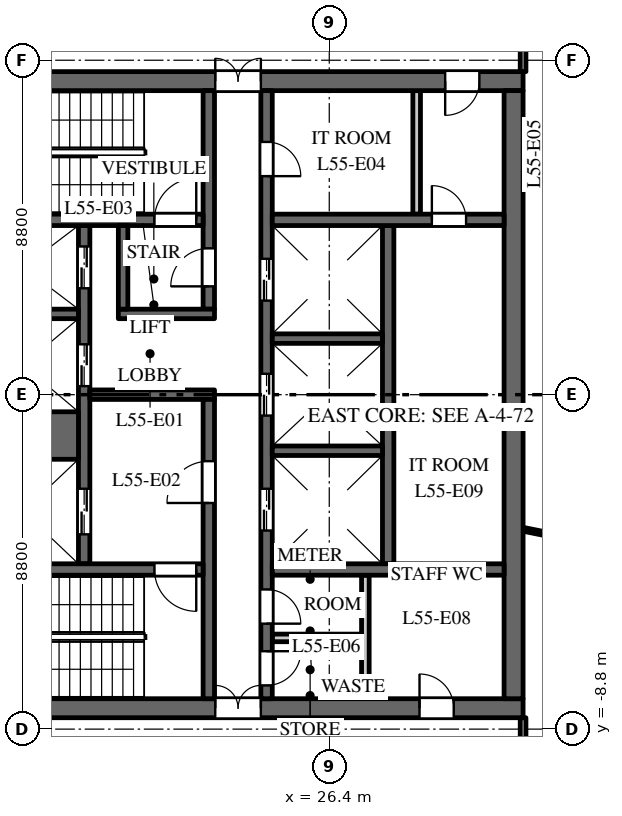
"""IFC4 building model, lengths in metres.
Left out: names, types, materials, properties, quantities, classifications, styles, units other than length and angle.
Written with IfcOpenShell. Run it as: python <this file> out.ifc"""

import sys

from ifc_helpers import new_model, si_unit, direction, frame, frame_2d, origin, place, context, subcontext, project, spatial, rectangle, extrude, element, fill, save


model = new_model("IFC4")
c1 = context("Model", 3, precision=1e-05, world=origin(), true_north=direction((0.0, 1.0)))
c2 = subcontext(c1, "Body", "Model", "MODEL_VIEW")
j1 = project(units=[si_unit("LENGTHUNIT", "METRE"), si_unit("PLANEANGLEUNIT", "RADIAN")], contexts=[c1])
p1 = place(None, origin())
s1 = spatial("IfcSite", under=j1, at=p1, CompositionType="ELEMENT")
p2 = place(p1, origin())
s2 = spatial("IfcBuilding", under=s1, at=p2, CompositionType="ELEMENT")
p3 = place(p2, frame((0.0, 0.0, 261.5)))
s3 = spatial("IfcBuildingStorey", under=s2, at=p3, CompositionType="ELEMENT", Elevation=261.5)
p4 = place(p3, frame((16.5, 8.25, 0.0), z_axis=(0.0, 0.0, 1.0), x_axis=(1.0, 0.0, 0.0)))
e1 = element("IfcWall", 1, at=p4, inside=s3, PredefinedType="SHEAR", context=c2, shape_type="SweptSolid", body=[
    extrude(rectangle(XDim=15.0, YDim=0.5, at=frame_2d((7.5, 0.0))), origin(), (0.0, 0.0, 1.0), 3.7),
])
p5 = place(p4, frame((6.9, 0.0, 0.0)))
e2 = element("IfcOpeningElement", 2, at=p5, cuts=e1, PredefinedType="OPENING", context=c2, shape_type="SweptSolid", body=[
    extrude(rectangle(XDim=1.2, YDim=2.1, at=frame_2d((0.6, 1.05))), frame((0.0, 0.26, 0.0), z_axis=(0.0, -1.0, 0.0), x_axis=(1.0, 0.0, 0.0)), (0.0, 0.0, 1.0), 0.52),
])
p6 = place(p4, frame((12.95, 0.0, 0.0)))
e3 = element("IfcOpeningElement", 3, at=p6, cuts=e1, PredefinedType="OPENING", context=c2, shape_type="SweptSolid", body=[
    extrude(rectangle(XDim=0.9, YDim=2.1, at=frame_2d((0.45, 1.05))), frame((0.0, 0.26, 0.0), z_axis=(0.0, -1.0, 0.0), x_axis=(1.0, 0.0, 0.0)), (0.0, 0.0, 1.0), 0.52),
])
p7 = place(p3, frame((16.5, -8.25, 0.0), z_axis=(0.0, 0.0, 1.0), x_axis=(1.0, 0.0, 0.0)))
e4 = element("IfcWall", 4, at=p7, inside=s3, PredefinedType="SHEAR", context=c2, shape_type="SweptSolid", body=[
    extrude(rectangle(XDim=15.0, YDim=0.5, at=frame_2d((7.5, 0.0))), origin(), (0.0, 0.0, 1.0), 3.7),
])
p8 = place(p7, frame((6.9, 0.0, 0.0)))
e5 = element("IfcOpeningElement", 5, at=p8, cuts=e4, PredefinedType="OPENING", context=c2, shape_type="SweptSolid", body=[
    extrude(rectangle(XDim=1.2, YDim=2.1, at=frame_2d((0.6, 1.05))), frame((0.0, 0.26, 0.0), z_axis=(0.0, -1.0, 0.0), x_axis=(1.0, 0.0, 0.0)), (0.0, 0.0, 1.0), 0.52),
])
p9 = place(p7, frame((12.275, 0.0, 0.0)))
e6 = element("IfcOpeningElement", 6, at=p9, cuts=e4, PredefinedType="OPENING", context=c2, shape_type="SweptSolid", body=[
    extrude(rectangle(XDim=0.9, YDim=2.1, at=frame_2d((0.45, 1.05))), frame((0.0, 0.26, 0.0), z_axis=(0.0, -1.0, 0.0), x_axis=(1.0, 0.0, 0.0)), (0.0, 0.0, 1.0), 0.52),
])
p10 = place(p3, frame((27.95, -4.45, 0.0), z_axis=(0.0, 0.0, 1.0), x_axis=(0.0, 1.0, 0.0)))
e7 = element("IfcWall", 7, at=p10, inside=s3, PredefinedType="SHEAR", context=c2, shape_type="SweptSolid", body=[
    extrude(rectangle(XDim=8.9, YDim=0.3, at=frame_2d((4.45, 0.0))), origin(), (0.0, 0.0, 1.0), 3.7),
])
p11 = place(p3, frame((19.95, -4.45, 0.0), z_axis=(0.0, 0.0, 1.0), x_axis=(0.0, 1.0, 0.0)))
e8 = element("IfcWall", 8, at=p11, inside=s3, PredefinedType="SHEAR", context=c2, shape_type="SweptSolid", body=[
    extrude(rectangle(XDim=8.9, YDim=0.3, at=frame_2d((4.45, 0.0))), origin(), (0.0, 0.0, 1.0), 3.7),
])
p12 = place(p11, frame((0.775, 0.0, 0.0)))
e9 = element("IfcOpeningElement", 9, at=p12, cuts=e8, PredefinedType="OPENING", context=c2, shape_type="SweptSolid", body=[
    extrude(rectangle(XDim=1.2, YDim=2.1, at=frame_2d((0.6, 1.05))), frame((0.0, 0.16, 0.0), z_axis=(0.0, -1.0, 0.0), x_axis=(1.0, 0.0, 0.0)), (0.0, 0.0, 1.0), 0.32),
])
p13 = place(p11, frame((4.675, 0.0, 0.0)))
e10 = element("IfcOpeningElement", 10, at=p13, cuts=e8, PredefinedType="OPENING", context=c2, shape_type="SweptSolid", body=[
    extrude(rectangle(XDim=1.1, YDim=2.1, at=frame_2d((0.55, 1.05))), frame((0.0, 0.16, 0.0), z_axis=(0.0, -1.0, 0.0), x_axis=(1.0, 0.0, 0.0)), (0.0, 0.0, 1.0), 0.32),
])
p14 = place(p11, frame((7.25, 0.0, 0.0)))
e11 = element("IfcOpeningElement", 11, at=p14, cuts=e8, PredefinedType="OPENING", context=c2, shape_type="SweptSolid", body=[
    extrude(rectangle(XDim=1.1, YDim=2.1, at=frame_2d((0.55, 1.05))), frame((0.0, 0.16, 0.0), z_axis=(0.0, -1.0, 0.0), x_axis=(1.0, 0.0, 0.0)), (0.0, 0.0, 1.0), 0.32),
])
p15 = place(p3, frame((24.75, -8.0, 0.0), z_axis=(0.0, 0.0, 1.0), x_axis=(0.0, 1.0, 0.0)))
e12 = element("IfcWall", 12, at=p15, inside=s3, PredefinedType="SHEAR", context=c2, shape_type="SweptSolid", body=[
    extrude(rectangle(XDim=16.0, YDim=0.3, at=frame_2d((8.0, 0.0))), origin(), (0.0, 0.0, 1.0), 3.7),
])
p16 = place(p15, frame((4.425, 0.0, 0.0)))
e13 = element("IfcOpeningElement", 13, at=p16, cuts=e12, PredefinedType="OPENING", context=c2, shape_type="SweptSolid", body=[
    extrude(rectangle(XDim=1.1, YDim=2.1, at=frame_2d((0.55, 1.05))), frame((0.0, 0.16, 0.0), z_axis=(0.0, -1.0, 0.0), x_axis=(1.0, 0.0, 0.0)), (0.0, 0.0, 1.0), 0.32),
])
p17 = place(p15, frame((7.45, 0.0, 0.0)))
e14 = element("IfcOpeningElement", 14, at=p17, cuts=e12, PredefinedType="OPENING", context=c2, shape_type="SweptSolid", body=[
    extrude(rectangle(XDim=1.1, YDim=2.1, at=frame_2d((0.55, 1.05))), frame((0.0, 0.16, 0.0), z_axis=(0.0, -1.0, 0.0), x_axis=(1.0, 0.0, 0.0)), (0.0, 0.0, 1.0), 0.32),
])
p18 = place(p15, frame((10.475, 0.0, 0.0)))
e15 = element("IfcOpeningElement", 15, at=p18, cuts=e12, PredefinedType="OPENING", context=c2, shape_type="SweptSolid", body=[
    extrude(rectangle(XDim=1.1, YDim=2.1, at=frame_2d((0.55, 1.05))), frame((0.0, 0.16, 0.0), z_axis=(0.0, -1.0, 0.0), x_axis=(1.0, 0.0, 0.0)), (0.0, 0.0, 1.0), 0.32),
])
p19 = place(p15, frame((13.75, 0.0, 0.0)))
e16 = element("IfcOpeningElement", 16, at=p19, cuts=e12, PredefinedType="OPENING", context=c2, shape_type="SweptSolid", body=[
    extrude(rectangle(XDim=0.9, YDim=2.1, at=frame_2d((0.45, 1.05))), frame((0.0, 0.16, 0.0), z_axis=(0.0, -1.0, 0.0), x_axis=(1.0, 0.0, 0.0)), (0.0, 0.0, 1.0), 0.32),
])
p20 = place(p15, frame((1.975, 0.0, 0.0)))
e17 = element("IfcOpeningElement", 17, at=p20, cuts=e12, PredefinedType="OPENING", context=c2, shape_type="SweptSolid", body=[
    extrude(rectangle(XDim=0.9, YDim=2.1, at=frame_2d((0.45, 1.05))), frame((0.0, 0.16, 0.0), z_axis=(0.0, -1.0, 0.0), x_axis=(1.0, 0.0, 0.0)), (0.0, 0.0, 1.0), 0.32),
])
p21 = place(p15, frame((0.35, 0.0, 0.0)))
e18 = element("IfcOpeningElement", 18, at=p21, cuts=e12, PredefinedType="OPENING", context=c2, shape_type="SweptSolid", body=[
    extrude(rectangle(XDim=0.9, YDim=2.1, at=frame_2d((0.45, 1.05))), frame((0.0, 0.16, 0.0), z_axis=(0.0, -1.0, 0.0), x_axis=(1.0, 0.0, 0.0)), (0.0, 0.0, 1.0), 0.32),
])
p22 = place(p3, frame((20.1, 0.0, 0.0), z_axis=(0.0, 0.0, 1.0), x_axis=(1.0, 0.0, 0.0)))
e19 = element("IfcWall", 19, at=p22, inside=s3, PredefinedType="SHEAR", context=c2, shape_type="SweptSolid", body=[
    extrude(rectangle(XDim=3.28, YDim=0.25, at=frame_2d((1.64, 0.0))), origin(), (0.0, 0.0, 1.0), 3.7),
])
p23 = place(p3, frame((31.25, -8.0, 0.0), z_axis=(0.0, 0.0, 1.0), x_axis=(0.0, 1.0, 0.0)))
e20 = element("IfcWall", 20, at=p23, inside=s3, PredefinedType="SHEAR", context=c2, shape_type="SweptSolid", body=[
    extrude(rectangle(XDim=16.0, YDim=0.5, at=frame_2d((8.0, 0.0))), origin(), (0.0, 0.0, 1.0), 3.7),
])
p24 = place(p3, frame((24.9, 4.6, 0.0), z_axis=(0.0, 0.0, 1.0), x_axis=(1.0, 0.0, 0.0)))
e21 = element("IfcWall", 21, at=p24, inside=s3, PredefinedType="SHEAR", context=c2, shape_type="SweptSolid", body=[
    extrude(rectangle(XDim=6.1, YDim=0.3, at=frame_2d((3.05, 0.0))), origin(), (0.0, 0.0, 1.0), 3.7),
])
p25 = place(p24, frame((4.2, 0.0, 0.0)))
e22 = element("IfcOpeningElement", 22, at=p25, cuts=e21, PredefinedType="OPENING", context=c2, shape_type="SweptSolid", body=[
    extrude(rectangle(XDim=0.9, YDim=2.1, at=frame_2d((0.45, 1.05))), frame((0.0, 0.16, 0.0), z_axis=(0.0, -1.0, 0.0), x_axis=(1.0, 0.0, 0.0)), (0.0, 0.0, 1.0), 0.32),
])
for number, where, z_axis, x_axis in (
    (23, (28.7, 4.75, 0.0), (0.0, 0.0, 1.0), (0.0, 1.0, 0.0)),
    (24, (27.35, -8.0, 0.0), (0.0, 0.0, 1.0), (0.0, 1.0, 0.0)),
):
    element("IfcWall", number, at=place(p3, frame(where, z_axis=z_axis, x_axis=x_axis)), inside=s3, PredefinedType="PARTITIONING", context=c2, shape_type="SweptSolid", body=[
        extrude(rectangle(XDim=3.25, YDim=0.2, at=frame_2d((1.625, 0.0))), origin(), (0.0, 0.0, 1.0), 3.7),
    ])
p26 = place(p3, frame((24.9, -6.4, 0.0), z_axis=(0.0, 0.0, 1.0), x_axis=(1.0, 0.0, 0.0)))
e25 = element("IfcWall", 25, at=p26, inside=s3, PredefinedType="PARTITIONING", context=c2, shape_type="SweptSolid", body=[
    extrude(rectangle(XDim=2.35, YDim=0.2, at=frame_2d((1.175, 0.0))), origin(), (0.0, 0.0, 1.0), 3.7),
])
p27 = place(p3, frame((24.9, -4.6, 0.0), z_axis=(0.0, 0.0, 1.0), x_axis=(1.0, 0.0, 0.0)))
e26 = element("IfcWall", 26, at=p27, inside=s3, PredefinedType="SHEAR", context=c2, shape_type="SweptSolid", body=[
    extrude(rectangle(XDim=6.1, YDim=0.3, at=frame_2d((3.05, 0.0))), origin(), (0.0, 0.0, 1.0), 3.7),
])
p28 = place(p3, frame((16.9, -1.075, 0.0), z_axis=(0.0, 0.0, 1.0), x_axis=(1.0, 0.0, 0.0)))
e27 = element("IfcWall", 27, at=p28, inside=s3, PredefinedType="SHEAR", context=c2, shape_type="SweptSolid", body=[
    extrude(rectangle(XDim=2.9, YDim=1.25, at=frame_2d((1.45, 0.0))), origin(), (0.0, 0.0, 1.0), 3.7),
])
for number, where, z_axis, x_axis in (
    (28, (16.9, 2.125, 0.0), (0.0, 0.0, 1.0), (1.0, 0.0, 0.0)),
    (29, (24.9, -1.475, 0.0), (0.0, 0.0, 1.0), (1.0, 0.0, 0.0)),
    (30, (24.9, 1.475, 0.0), (0.0, 0.0, 1.0), (1.0, 0.0, 0.0)),
):
    element("IfcWall", number, at=place(p3, frame(where, z_axis=z_axis, x_axis=x_axis)), inside=s3, PredefinedType="SHEAR", context=c2, shape_type="SweptSolid", body=[
        extrude(rectangle(XDim=2.9, YDim=0.25, at=frame_2d((1.45, 0.0))), origin(), (0.0, 0.0, 1.0), 3.7),
    ])
p29 = place(p3, frame((23.23, 2.25, 0.0), z_axis=(0.0, 0.0, 1.0), x_axis=(0.0, 1.0, 0.0)))
e31 = element("IfcWall", 31, at=p29, inside=s3, PredefinedType="SHEAR", context=c2, shape_type="SweptSolid", body=[
    extrude(rectangle(XDim=5.75, YDim=0.3, at=frame_2d((2.875, 0.0))), origin(), (0.0, 0.0, 1.0), 3.7),
])
p30 = place(p29, frame((0.6, 0.0, 0.0)))
e32 = element("IfcOpeningElement", 32, at=p30, cuts=e31, PredefinedType="OPENING", context=c2, shape_type="SweptSolid", body=[
    extrude(rectangle(XDim=1.0, YDim=2.1, at=frame_2d((0.5, 1.05))), frame((0.0, 0.16, 0.0), z_axis=(0.0, -1.0, 0.0), x_axis=(1.0, 0.0, 0.0)), (0.0, 0.0, 1.0), 0.32),
])
p31 = place(p3, frame((23.23, -8.0, 0.0), z_axis=(0.0, 0.0, 1.0), x_axis=(0.0, 1.0, 0.0)))
e33 = element("IfcWall", 33, at=p31, inside=s3, PredefinedType="SHEAR", context=c2, shape_type="SweptSolid", body=[
    extrude(rectangle(XDim=7.875, YDim=0.3, at=frame_2d((3.938, 0.0))), origin(), (0.0, 0.0, 1.0), 3.7),
])
p32 = place(p31, frame((5.15, 0.0, 0.0)))
e34 = element("IfcOpeningElement", 34, at=p32, cuts=e33, PredefinedType="OPENING", context=c2, shape_type="SweptSolid", body=[
    extrude(rectangle(XDim=1.1, YDim=2.1, at=frame_2d((0.55, 1.05))), frame((0.0, 0.16, 0.0), z_axis=(0.0, -1.0, 0.0), x_axis=(1.0, 0.0, 0.0)), (0.0, 0.0, 1.0), 0.32),
])
p33 = place(p3, frame((16.9, 4.6, 0.0), z_axis=(0.0, 0.0, 1.0), x_axis=(1.0, 0.0, 0.0)))
e35 = element("IfcWall", 35, at=p33, inside=s3, PredefinedType="SHEAR", context=c2, shape_type="SweptSolid", body=[
    extrude(rectangle(XDim=6.18, YDim=0.3, at=frame_2d((3.09, 0.0))), origin(), (0.0, 0.0, 1.0), 3.7),
])
p34 = place(p33, frame((4.9, 0.0, 0.0)))
e36 = element("IfcOpeningElement", 36, at=p34, cuts=e35, PredefinedType="OPENING", context=c2, shape_type="SweptSolid", body=[
    extrude(rectangle(XDim=1.1, YDim=2.1, at=frame_2d((0.55, 1.05))), frame((0.0, 0.16, 0.0), z_axis=(0.0, -1.0, 0.0), x_axis=(1.0, 0.0, 0.0)), (0.0, 0.0, 1.0), 0.32),
])
p35 = place(p3, frame((16.9, -4.6, 0.0), z_axis=(0.0, 0.0, 1.0), x_axis=(1.0, 0.0, 0.0)))
e37 = element("IfcWall", 37, at=p35, inside=s3, PredefinedType="SHEAR", context=c2, shape_type="SweptSolid", body=[
    extrude(rectangle(XDim=6.18, YDim=0.3, at=frame_2d((3.09, 0.0))), origin(), (0.0, 0.0, 1.0), 3.7),
])
p36 = place(p35, frame((4.9, 0.0, 0.0)))
e38 = element("IfcOpeningElement", 38, at=p36, cuts=e37, PredefinedType="OPENING", context=c2, shape_type="SweptSolid", body=[
    extrude(rectangle(XDim=1.1, YDim=2.1, at=frame_2d((0.55, 1.05))), frame((0.0, 0.16, 0.0), z_axis=(0.0, -1.0, 0.0), x_axis=(1.0, 0.0, 0.0)), (0.0, 0.0, 1.0), 0.32),
])
p37 = place(p3, frame((20.85, 2.125, 0.0), z_axis=(0.0, 0.0, 1.0), x_axis=(1.0, 0.0, 0.0)))
e39 = element("IfcWall", 39, at=p37, inside=s3, PredefinedType="SHEAR", context=c2, shape_type="SweptSolid", body=[
    extrude(rectangle(XDim=2.53, YDim=0.25, at=frame_2d((1.265, 0.0))), origin(), (0.0, 0.0, 1.0), 3.7),
])
p38 = place(p3, frame((20.975, 2.25, 0.0), z_axis=(0.0, 0.0, 1.0), x_axis=(0.0, 1.0, 0.0)))
e40 = element("IfcWall", 40, at=p38, inside=s3, PredefinedType="SHEAR", context=c2, shape_type="SweptSolid", body=[
    extrude(rectangle(XDim=2.2, YDim=0.25, at=frame_2d((1.1, 0.0))), origin(), (0.0, 0.0, 1.0), 3.7),
])
p39 = place(p3, frame((31.5, -10.7, 0.0), z_axis=(0.0, 0.0, 1.0), x_axis=(0.0, 1.0, 0.0)))
e41 = element("IfcWall", 41, at=p39, inside=s3, PredefinedType="PARTITIONING", context=c2, shape_type="SweptSolid", body=[
    extrude(rectangle(XDim=2.2, YDim=0.15, at=frame_2d((1.1, 0.0))), origin(), (0.0, 0.0, 1.0), 3.0),
])
p40 = place(p3, frame((31.5, -3.542, 0.0), z_axis=(0.0, 0.0, 1.0), x_axis=(0.980357474535, -0.197228857227, 0.0)))
e42 = element("IfcWall", 42, at=p40, inside=s3, PredefinedType="PARTITIONING", context=c2, shape_type="SweptSolid", body=[
    extrude(rectangle(XDim=4.092, YDim=0.1, at=frame_2d((2.046, 0.0))), origin(), (0.0, 0.0, 1.0), 3.0),
])
p41 = place(p3, frame((31.5, 8.5, 0.0), z_axis=(0.0, 0.0, 1.0), x_axis=(0.0, 1.0, 0.0)))
e43 = element("IfcWall", 43, at=p41, inside=s3, PredefinedType="PARTITIONING", context=c2, shape_type="SweptSolid", body=[
    extrude(rectangle(XDim=2.2, YDim=0.15, at=frame_2d((1.1, 0.0))), origin(), (0.0, 0.0, 1.0), 3.0),
])
p42 = place(p12, origin())
e44 = element("IfcDoor", 44, at=p42, inside=s3, OperationType="DOUBLE_DOOR_SLIDING", PredefinedType="DOOR", context=c2, shape_type="SweptSolid", body=[
    extrude(rectangle(XDim=1.2, YDim=2.1, at=frame_2d((0.6, 1.05))), frame((0.0, 0.025, 0.0), z_axis=(0.0, -1.0, 0.0), x_axis=(1.0, 0.0, 0.0)), (0.0, 0.0, 1.0), 0.05),
])
fill(e9, e44)
p43 = place(p13, origin())
e45 = element("IfcDoor", 45, at=p43, inside=s3, OperationType="DOUBLE_DOOR_SLIDING", PredefinedType="DOOR", context=c2, shape_type="SweptSolid", body=[
    extrude(rectangle(XDim=1.1, YDim=2.1, at=frame_2d((0.55, 1.05))), frame((0.0, 0.025, 0.0), z_axis=(0.0, -1.0, 0.0), x_axis=(1.0, 0.0, 0.0)), (0.0, 0.0, 1.0), 0.05),
])
fill(e10, e45)
p44 = place(p14, origin())
e46 = element("IfcDoor", 46, at=p44, inside=s3, OperationType="DOUBLE_DOOR_SLIDING", PredefinedType="DOOR", context=c2, shape_type="SweptSolid", body=[
    extrude(rectangle(XDim=1.1, YDim=2.1, at=frame_2d((0.55, 1.05))), frame((0.0, 0.025, 0.0), z_axis=(0.0, -1.0, 0.0), x_axis=(1.0, 0.0, 0.0)), (0.0, 0.0, 1.0), 0.05),
])
fill(e11, e46)
p45 = place(p16, origin())
e47 = element("IfcDoor", 47, at=p45, inside=s3, OperationType="DOUBLE_DOOR_SLIDING", PredefinedType="DOOR", context=c2, shape_type="SweptSolid", body=[
    extrude(rectangle(XDim=1.1, YDim=2.1, at=frame_2d((0.55, 1.05))), frame((0.0, 0.025, 0.0), z_axis=(0.0, -1.0, 0.0), x_axis=(1.0, 0.0, 0.0)), (0.0, 0.0, 1.0), 0.05),
])
fill(e13, e47)
p46 = place(p17, origin())
e48 = element("IfcDoor", 48, at=p46, inside=s3, OperationType="DOUBLE_DOOR_SLIDING", PredefinedType="DOOR", context=c2, shape_type="SweptSolid", body=[
    extrude(rectangle(XDim=1.1, YDim=2.1, at=frame_2d((0.55, 1.05))), frame((0.0, 0.025, 0.0), z_axis=(0.0, -1.0, 0.0), x_axis=(1.0, 0.0, 0.0)), (0.0, 0.0, 1.0), 0.05),
])
fill(e14, e48)
p47 = place(p18, origin())
e49 = element("IfcDoor", 49, at=p47, inside=s3, OperationType="DOUBLE_DOOR_SLIDING", PredefinedType="DOOR", context=c2, shape_type="SweptSolid", body=[
    extrude(rectangle(XDim=1.1, YDim=2.1, at=frame_2d((0.55, 1.05))), frame((0.0, 0.025, 0.0), z_axis=(0.0, -1.0, 0.0), x_axis=(1.0, 0.0, 0.0)), (0.0, 0.0, 1.0), 0.05),
])
fill(e15, e49)
p48 = place(p34, origin())
e50 = element("IfcDoor", 50, at=p48, inside=s3, OperationType="SINGLE_SWING_LEFT", PredefinedType="DOOR", context=c2, shape_type="SweptSolid", body=[
    extrude(rectangle(XDim=1.1, YDim=2.1, at=frame_2d((0.55, 1.05))), frame((0.0, 0.025, 0.0), z_axis=(0.0, -1.0, 0.0), x_axis=(1.0, 0.0, 0.0)), (0.0, 0.0, 1.0), 0.05),
])
fill(e36, e50)
p49 = place(p36, origin())
e51 = element("IfcDoor", 51, at=p49, inside=s3, OperationType="SINGLE_SWING_RIGHT", PredefinedType="DOOR", context=c2, shape_type="SweptSolid", body=[
    extrude(rectangle(XDim=1.1, YDim=2.1, at=frame_2d((0.55, 1.05))), frame((0.0, 0.025, 0.0), z_axis=(0.0, -1.0, 0.0), x_axis=(1.0, 0.0, 0.0)), (0.0, 0.0, 1.0), 0.05),
])
fill(e38, e51)
p50 = place(p32, origin())
e52 = element("IfcDoor", 52, at=p50, inside=s3, OperationType="SINGLE_SWING_RIGHT", PredefinedType="DOOR", context=c2, shape_type="SweptSolid", body=[
    extrude(rectangle(XDim=1.1, YDim=2.1, at=frame_2d((0.55, 1.05))), frame((0.0, 0.025, 0.0), z_axis=(0.0, -1.0, 0.0), x_axis=(1.0, 0.0, 0.0)), (0.0, 0.0, 1.0), 0.05),
])
fill(e34, e52)
p51 = place(p30, origin())
e53 = element("IfcDoor", 53, at=p51, inside=s3, OperationType="SINGLE_SWING_RIGHT", PredefinedType="DOOR", context=c2, shape_type="SweptSolid", body=[
    extrude(rectangle(XDim=1.0, YDim=2.1, at=frame_2d((0.5, 1.05))), frame((0.0, 0.025, 0.0), z_axis=(0.0, -1.0, 0.0), x_axis=(1.0, 0.0, 0.0)), (0.0, 0.0, 1.0), 0.05),
])
fill(e32, e53)
p52 = place(p5, origin())
e54 = element("IfcDoor", 54, at=p52, inside=s3, OperationType="DOUBLE_DOOR_DOUBLE_SWING", PredefinedType="DOOR", context=c2, shape_type="SweptSolid", body=[
    extrude(rectangle(XDim=1.2, YDim=2.1, at=frame_2d((0.6, 1.05))), frame((0.0, 0.025, 0.0), z_axis=(0.0, -1.0, 0.0), x_axis=(1.0, 0.0, 0.0)), (0.0, 0.0, 1.0), 0.05),
])
fill(e2, e54)
p53 = place(p8, origin())
e55 = element("IfcDoor", 55, at=p53, inside=s3, OperationType="DOUBLE_DOOR_DOUBLE_SWING", PredefinedType="DOOR", context=c2, shape_type="SweptSolid", body=[
    extrude(rectangle(XDim=1.2, YDim=2.1, at=frame_2d((0.6, 1.05))), frame((0.0, 0.025, 0.0), z_axis=(0.0, -1.0, 0.0), x_axis=(1.0, 0.0, 0.0)), (0.0, 0.0, 1.0), 0.05),
])
fill(e5, e55)
p54 = place(p19, origin())
e56 = element("IfcDoor", 56, at=p54, inside=s3, OperationType="SINGLE_SWING_LEFT", PredefinedType="DOOR", context=c2, shape_type="SweptSolid", body=[
    extrude(rectangle(XDim=0.9, YDim=2.1, at=frame_2d((0.45, 1.05))), frame((0.0, 0.025, 0.0), z_axis=(0.0, -1.0, 0.0), x_axis=(1.0, 0.0, 0.0)), (0.0, 0.0, 1.0), 0.05),
])
fill(e16, e56)
p55 = place(p6, origin())
e57 = element("IfcDoor", 57, at=p55, inside=s3, OperationType="SINGLE_SWING_LEFT", PredefinedType="DOOR", context=c2, shape_type="SweptSolid", body=[
    extrude(rectangle(XDim=0.9, YDim=2.1, at=frame_2d((0.45, 1.05))), frame((0.0, 0.025, 0.0), z_axis=(0.0, -1.0, 0.0), x_axis=(1.0, 0.0, 0.0)), (0.0, 0.0, 1.0), 0.05),
])
fill(e3, e57)
p56 = place(p20, origin())
e58 = element("IfcDoor", 58, at=p56, inside=s3, OperationType="SINGLE_SWING_LEFT", PredefinedType="DOOR", context=c2, shape_type="SweptSolid", body=[
    extrude(rectangle(XDim=0.9, YDim=2.1, at=frame_2d((0.45, 1.05))), frame((0.0, 0.025, 0.0), z_axis=(0.0, -1.0, 0.0), x_axis=(1.0, 0.0, 0.0)), (0.0, 0.0, 1.0), 0.05),
])
fill(e17, e58)
p57 = place(p21, origin())
e59 = element("IfcDoor", 59, at=p57, inside=s3, OperationType="SINGLE_SWING_RIGHT", PredefinedType="DOOR", context=c2, shape_type="SweptSolid", body=[
    extrude(rectangle(XDim=0.9, YDim=2.1, at=frame_2d((0.45, 1.05))), frame((0.0, 0.025, 0.0), z_axis=(0.0, -1.0, 0.0), x_axis=(1.0, 0.0, 0.0)), (0.0, 0.0, 1.0), 0.05),
])
fill(e18, e59)
p58 = place(p9, origin())
e60 = element("IfcDoor", 60, at=p58, inside=s3, OperationType="SINGLE_SWING_RIGHT", PredefinedType="DOOR", context=c2, shape_type="SweptSolid", body=[
    extrude(rectangle(XDim=0.9, YDim=2.1, at=frame_2d((0.45, 1.05))), frame((0.0, 0.025, 0.0), z_axis=(0.0, -1.0, 0.0), x_axis=(1.0, 0.0, 0.0)), (0.0, 0.0, 1.0), 0.05),
])
fill(e6, e60)
p59 = place(p25, origin())
e61 = element("IfcDoor", 61, at=p59, inside=s3, OperationType="SINGLE_SWING_RIGHT", PredefinedType="DOOR", context=c2, shape_type="SweptSolid", body=[
    extrude(rectangle(XDim=0.9, YDim=2.1, at=frame_2d((0.45, 1.05))), frame((0.0, 0.025, 0.0), z_axis=(0.0, -1.0, 0.0), x_axis=(1.0, 0.0, 0.0)), (0.0, 0.0, 1.0), 0.05),
])
fill(e22, e61)
save(model, sys.argv[1])
